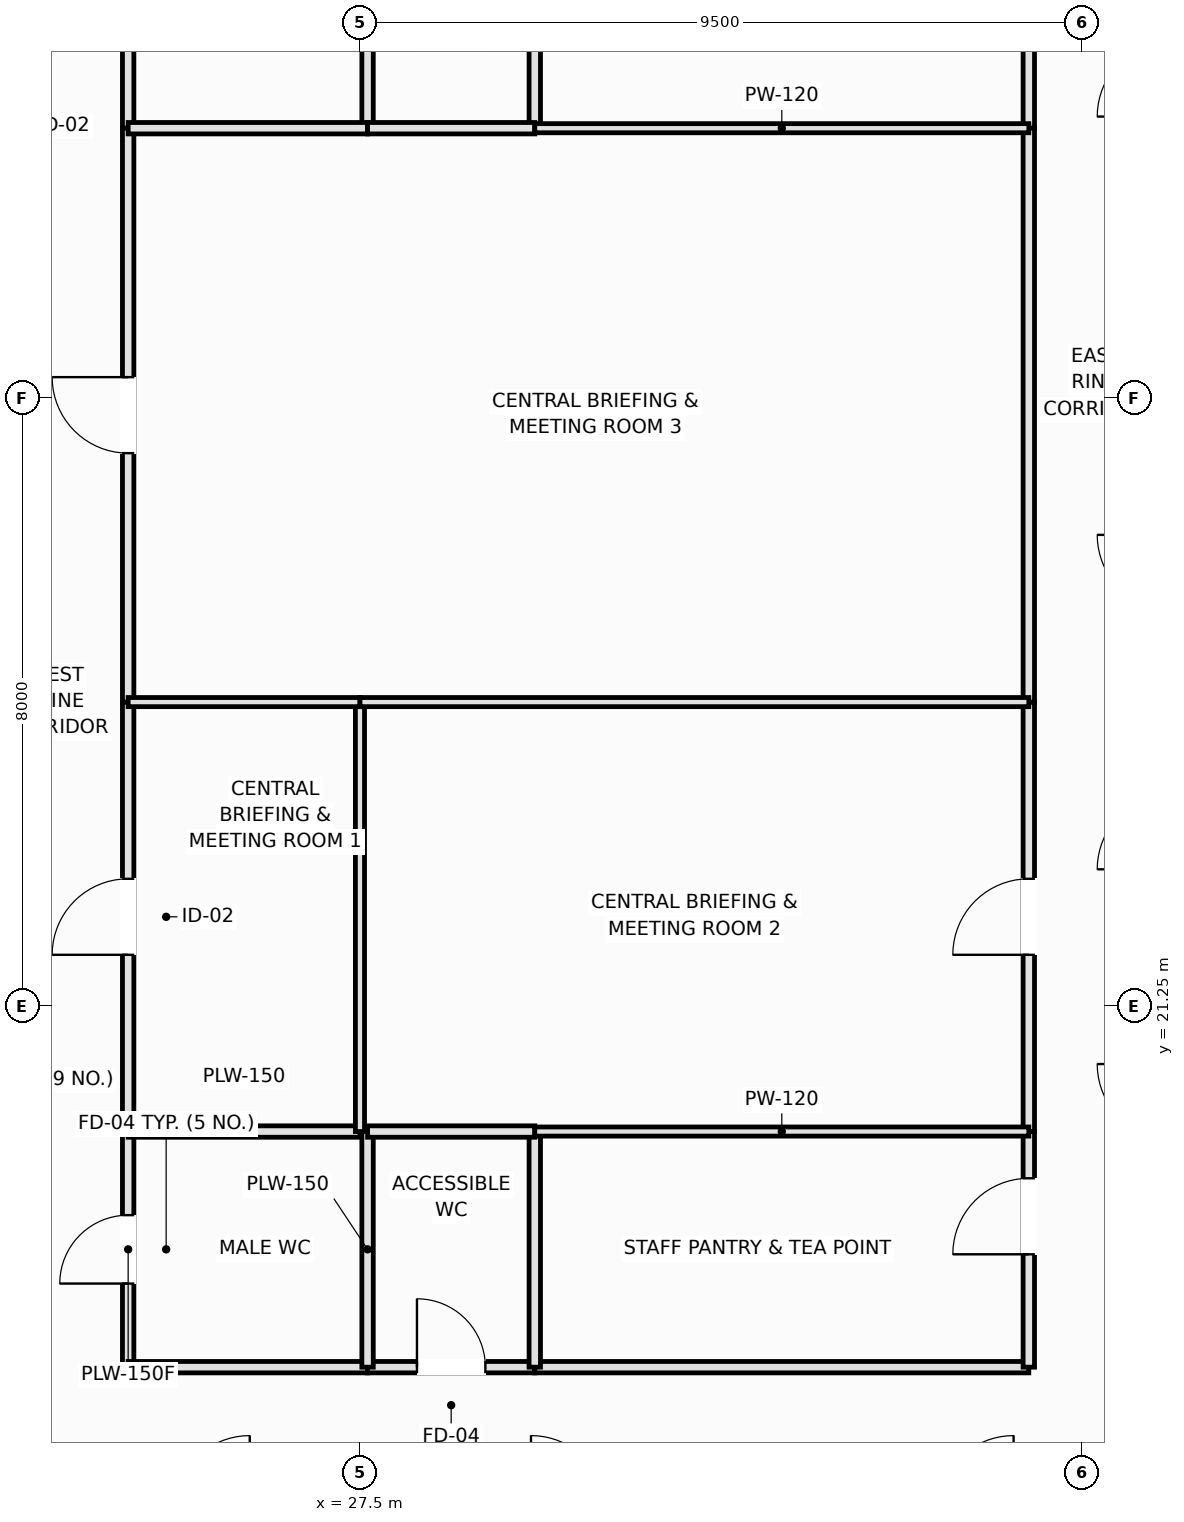
"""IFC4 building model, lengths in metres.
Left out: names, types, materials, properties, quantities, classifications, styles, units other than length and angle.
Written with IfcOpenShell. Run it as: python <this file> out.ifc"""

import sys

from ifc_helpers import new_model, si_unit, direction, frame, frame_2d, origin, place, context, subcontext, project, spatial, rectangle, extrude, element, fill, save


model = new_model("IFC4")
c1 = context("Model", 3, precision=1e-05, world=origin(), true_north=direction((0.0, 1.0)))
c2 = subcontext(c1, "Body", "Model", "MODEL_VIEW")
j1 = project(units=[si_unit("LENGTHUNIT", "METRE"), si_unit("PLANEANGLEUNIT", "RADIAN")], contexts=[c1])
p1 = place(None, origin())
s1 = spatial("IfcSite", under=j1, at=p1, CompositionType="ELEMENT")
p2 = place(p1, origin())
s2 = spatial("IfcBuilding", under=s1, at=p2, CompositionType="ELEMENT")
p3 = place(p2, frame((0.0, 0.0, 64.65)))
s3 = spatial("IfcBuildingStorey", under=s2, at=p3, CompositionType="ELEMENT", Elevation=64.65)
p4 = place(p3, frame((24.45, 16.5, 0.0), z_axis=(0.0, 0.0, 1.0), x_axis=(0.0, 1.0, 0.0)))
e1 = element("IfcWall", 1, at=p4, inside=s3, PredefinedType="PLUMBINGWALL", context=c2, shape_type="SweptSolid", body=[
    extrude(rectangle(XDim=3.1, YDim=0.15, at=frame_2d((1.55, 0.0))), origin(), (0.0, 0.0, 1.0), 3.37),
])
p5 = place(p4, frame((1.1, 0.0, 0.0)))
e2 = element("IfcOpeningElement", 2, at=p5, cuts=e1, PredefinedType="OPENING", context=c2, shape_type="SweptSolid", body=[
    extrude(rectangle(XDim=0.9, YDim=2.1, at=frame_2d((0.45, 1.05))), frame((0.0, 0.085, 0.0), z_axis=(0.0, -1.0, 0.0), x_axis=(1.0, 0.0, 0.0)), (0.0, 0.0, 1.0), 0.17),
])
p6 = place(p3, frame((24.45, 32.8, 0.0), z_axis=(0.0, 0.0, 1.0), x_axis=(0.0, 1.0, 0.0)))
e3 = element("IfcWall", 3, at=p6, inside=s3, PredefinedType="PLUMBINGWALL", context=c2, shape_type="SweptSolid", body=[
    extrude(rectangle(XDim=3.1, YDim=0.15, at=frame_2d((1.55, 0.0))), origin(), (0.0, 0.0, 1.0), 3.37),
])
p7 = place(p6, frame((1.1, 0.0, 0.0)))
e4 = element("IfcOpeningElement", 4, at=p7, cuts=e3, PredefinedType="OPENING", context=c2, shape_type="SweptSolid", body=[
    extrude(rectangle(XDim=0.9, YDim=2.1, at=frame_2d((0.45, 1.05))), frame((0.0, 0.085, 0.0), z_axis=(0.0, -1.0, 0.0), x_axis=(1.0, 0.0, 0.0)), (0.0, 0.0, 1.0), 0.17),
])
p8 = place(p3, frame((24.45, 19.6, 0.0), z_axis=(0.0, 0.0, 1.0), x_axis=(0.0, 1.0, 0.0)))
e5 = element("IfcWall", 5, at=p8, inside=s3, PredefinedType="PARTITIONING", context=c2, shape_type="SweptSolid", body=[
    extrude(rectangle(XDim=5.65, YDim=0.15, at=frame_2d((2.825, 0.0))), origin(), (0.0, 0.0, 1.0), 3.37),
])
p9 = place(p8, frame((2.325, 0.0, 0.0)))
e6 = element("IfcOpeningElement", 6, at=p9, cuts=e5, PredefinedType="OPENING", context=c2, shape_type="SweptSolid", body=[
    extrude(rectangle(XDim=1.0, YDim=2.15, at=frame_2d((0.5, 1.075))), frame((0.0, 0.085, 0.0), z_axis=(0.0, -1.0, 0.0), x_axis=(1.0, 0.0, 0.0)), (0.0, 0.0, 1.0), 0.17),
])
p10 = place(p3, frame((24.45, 25.25, 0.0), z_axis=(0.0, 0.0, 1.0), x_axis=(0.0, 1.0, 0.0)))
e7 = element("IfcWall", 7, at=p10, inside=s3, PredefinedType="PARTITIONING", context=c2, shape_type="SweptSolid", body=[
    extrude(rectangle(XDim=7.55, YDim=0.15, at=frame_2d((3.775, 0.0))), origin(), (0.0, 0.0, 1.0), 3.37),
])
p11 = place(p10, frame((3.275, 0.0, 0.0)))
e8 = element("IfcOpeningElement", 8, at=p11, cuts=e7, PredefinedType="OPENING", context=c2, shape_type="SweptSolid", body=[
    extrude(rectangle(XDim=1.0, YDim=2.15, at=frame_2d((0.5, 1.075))), frame((0.0, 0.085, 0.0), z_axis=(0.0, -1.0, 0.0), x_axis=(1.0, 0.0, 0.0)), (0.0, 0.0, 1.0), 0.17),
])
p12 = place(p3, frame((24.45, 16.5, 0.0), z_axis=(0.0, 0.0, 1.0), x_axis=(1.0, 0.0, 0.0)))
e9 = element("IfcWall", 9, at=p12, inside=s3, PredefinedType="PLUMBINGWALL", context=c2, shape_type="SweptSolid", body=[
    extrude(rectangle(XDim=3.15, YDim=0.15, at=frame_2d((1.575, 0.0))), origin(), (0.0, 0.0, 1.0), 3.37),
])
p13 = place(p3, frame((27.6, 16.5, 0.0), z_axis=(0.0, 0.0, 1.0), x_axis=(1.0, 0.0, 0.0)))
e10 = element("IfcWall", 10, at=p13, inside=s3, PredefinedType="PLUMBINGWALL", context=c2, shape_type="SweptSolid", body=[
    extrude(rectangle(XDim=2.2, YDim=0.15, at=frame_2d((1.1, 0.0))), origin(), (0.0, 0.0, 1.0), 3.37),
])
p14 = place(p13, frame((0.65, 0.0, 0.0)))
e11 = element("IfcOpeningElement", 11, at=p14, cuts=e10, PredefinedType="OPENING", context=c2, shape_type="SweptSolid", body=[
    extrude(rectangle(XDim=0.9, YDim=2.1, at=frame_2d((0.45, 1.05))), frame((0.0, 0.085, 0.0), z_axis=(0.0, -1.0, 0.0), x_axis=(1.0, 0.0, 0.0)), (0.0, 0.0, 1.0), 0.17),
])
p15 = place(p3, frame((29.8, 16.5, 0.0), z_axis=(0.0, 0.0, 1.0), x_axis=(1.0, 0.0, 0.0)))
e12 = element("IfcWall", 12, at=p15, inside=s3, PredefinedType="PARTITIONING", context=c2, shape_type="SweptSolid", body=[
    extrude(rectangle(XDim=6.5, YDim=0.15, at=frame_2d((3.25, 0.0))), origin(), (0.0, 0.0, 1.0), 3.37),
])
p16 = place(p3, frame((36.3, 16.5, 0.0), z_axis=(0.0, 0.0, 1.0), x_axis=(0.0, 1.0, 0.0)))
e13 = element("IfcWall", 13, at=p16, inside=s3, PredefinedType="PARTITIONING", context=c2, shape_type="SweptSolid", body=[
    extrude(rectangle(XDim=3.1, YDim=0.15, at=frame_2d((1.55, 0.0))), origin(), (0.0, 0.0, 1.0), 3.37),
])
p17 = place(p16, frame((1.485, 0.0, 0.0)))
e14 = element("IfcOpeningElement", 14, at=p17, cuts=e13, PredefinedType="OPENING", context=c2, shape_type="SweptSolid", body=[
    extrude(rectangle(XDim=1.0, YDim=2.15, at=frame_2d((0.5, 1.075))), frame((0.0, 0.085, 0.0), z_axis=(0.0, -1.0, 0.0), x_axis=(1.0, 0.0, 0.0)), (0.0, 0.0, 1.0), 0.17),
])
p18 = place(p3, frame((36.3, 32.8, 0.0), z_axis=(0.0, 0.0, 1.0), x_axis=(0.0, 1.0, 0.0)))
e15 = element("IfcWall", 15, at=p18, inside=s3, PredefinedType="PARTITIONING", context=c2, shape_type="SweptSolid", body=[
    extrude(rectangle(XDim=3.1, YDim=0.15, at=frame_2d((1.55, 0.0))), origin(), (0.0, 0.0, 1.0), 3.37),
])
p19 = place(p18, frame((1.05, 0.0, 0.0)))
e16 = element("IfcOpeningElement", 16, at=p19, cuts=e15, PredefinedType="OPENING", context=c2, shape_type="SweptSolid", body=[
    extrude(rectangle(XDim=1.0, YDim=2.15, at=frame_2d((0.5, 1.075))), frame((0.0, 0.085, 0.0), z_axis=(0.0, -1.0, 0.0), x_axis=(1.0, 0.0, 0.0)), (0.0, 0.0, 1.0), 0.17),
])
p20 = place(p3, frame((36.3, 19.6, 0.0), z_axis=(0.0, 0.0, 1.0), x_axis=(0.0, 1.0, 0.0)))
e17 = element("IfcWall", 17, at=p20, inside=s3, PredefinedType="PARTITIONING", context=c2, shape_type="SweptSolid", body=[
    extrude(rectangle(XDim=5.65, YDim=0.15, at=frame_2d((2.825, 0.0))), origin(), (0.0, 0.0, 1.0), 3.37),
])
p21 = place(p20, frame((2.325, 0.0, 0.0)))
e18 = element("IfcOpeningElement", 18, at=p21, cuts=e17, PredefinedType="OPENING", context=c2, shape_type="SweptSolid", body=[
    extrude(rectangle(XDim=1.0, YDim=2.15, at=frame_2d((0.5, 1.075))), frame((0.0, 0.085, 0.0), z_axis=(0.0, -1.0, 0.0), x_axis=(1.0, 0.0, 0.0)), (0.0, 0.0, 1.0), 0.17),
])
p22 = place(p3, frame((36.3, 25.25, 0.0), z_axis=(0.0, 0.0, 1.0), x_axis=(0.0, 1.0, 0.0)))
e19 = element("IfcWall", 19, at=p22, inside=s3, PredefinedType="PARTITIONING", context=c2, shape_type="SweptSolid", body=[
    extrude(rectangle(XDim=7.55, YDim=0.15, at=frame_2d((3.775, 0.0))), origin(), (0.0, 0.0, 1.0), 3.37),
])
p23 = place(p3, frame((27.6, 16.5, 0.0), z_axis=(0.0, 0.0, 1.0), x_axis=(0.0, 1.0, 0.0)))
e20 = element("IfcWall", 20, at=p23, inside=s3, PredefinedType="PLUMBINGWALL", context=c2, shape_type="SweptSolid", body=[
    extrude(rectangle(XDim=3.1, YDim=0.15, at=frame_2d((1.55, 0.0))), origin(), (0.0, 0.0, 1.0), 3.37),
])
p24 = place(p3, frame((24.45, 19.6, 0.0), z_axis=(0.0, 0.0, 1.0), x_axis=(1.0, 0.0, 0.0)))
e21 = element("IfcWall", 21, at=p24, inside=s3, PredefinedType="PLUMBINGWALL", context=c2, shape_type="SweptSolid", body=[
    extrude(rectangle(XDim=3.05, YDim=0.15, at=frame_2d((1.525, 0.0))), origin(), (0.0, 0.0, 1.0), 3.37),
])
p25 = place(p3, frame((27.6, 32.8, 0.0), z_axis=(0.0, 0.0, 1.0), x_axis=(0.0, 1.0, 0.0)))
e22 = element("IfcWall", 22, at=p25, inside=s3, PredefinedType="PLUMBINGWALL", context=c2, shape_type="SweptSolid", body=[
    extrude(rectangle(XDim=3.1, YDim=0.15, at=frame_2d((1.55, 0.0))), origin(), (0.0, 0.0, 1.0), 3.37),
])
p26 = place(p3, frame((24.45, 32.8, 0.0), z_axis=(0.0, 0.0, 1.0), x_axis=(1.0, 0.0, 0.0)))
e23 = element("IfcWall", 23, at=p26, inside=s3, PredefinedType="PLUMBINGWALL", context=c2, shape_type="SweptSolid", body=[
    extrude(rectangle(XDim=3.15, YDim=0.15, at=frame_2d((1.575, 0.0))), origin(), (0.0, 0.0, 1.0), 3.37),
])
p27 = place(p3, frame((29.8, 16.5, 0.0), z_axis=(0.0, 0.0, 1.0), x_axis=(0.0, 1.0, 0.0)))
e24 = element("IfcWall", 24, at=p27, inside=s3, PredefinedType="PLUMBINGWALL", context=c2, shape_type="SweptSolid", body=[
    extrude(rectangle(XDim=3.1, YDim=0.15, at=frame_2d((1.55, 0.0))), origin(), (0.0, 0.0, 1.0), 3.37),
])
p28 = place(p3, frame((27.6, 19.6, 0.0), z_axis=(0.0, 0.0, 1.0), x_axis=(1.0, 0.0, 0.0)))
e25 = element("IfcWall", 25, at=p28, inside=s3, PredefinedType="PLUMBINGWALL", context=c2, shape_type="SweptSolid", body=[
    extrude(rectangle(XDim=2.2, YDim=0.15, at=frame_2d((1.1, 0.0))), origin(), (0.0, 0.0, 1.0), 3.37),
])
p29 = place(p3, frame((29.8, 32.8, 0.0), z_axis=(0.0, 0.0, 1.0), x_axis=(0.0, 1.0, 0.0)))
e26 = element("IfcWall", 26, at=p29, inside=s3, PredefinedType="PLUMBINGWALL", context=c2, shape_type="SweptSolid", body=[
    extrude(rectangle(XDim=3.1, YDim=0.15, at=frame_2d((1.55, 0.0))), origin(), (0.0, 0.0, 1.0), 3.37),
])
p30 = place(p3, frame((27.6, 32.8, 0.0), z_axis=(0.0, 0.0, 1.0), x_axis=(1.0, 0.0, 0.0)))
e27 = element("IfcWall", 27, at=p30, inside=s3, PredefinedType="PLUMBINGWALL", context=c2, shape_type="SweptSolid", body=[
    extrude(rectangle(XDim=2.2, YDim=0.15, at=frame_2d((1.1, 0.0))), origin(), (0.0, 0.0, 1.0), 3.37),
])
for number, where, z_axis, x_axis in (
    (28, (29.8, 19.6, 0.0), (0.0, 0.0, 1.0), (1.0, 0.0, 0.0)),
    (29, (29.8, 32.8, 0.0), (0.0, 0.0, 1.0), (1.0, 0.0, 0.0)),
):
    element("IfcWall", number, at=place(p3, frame(where, z_axis=z_axis, x_axis=x_axis)), inside=s3, PredefinedType="PARTITIONING", context=c2, shape_type="SweptSolid", body=[
        extrude(rectangle(XDim=6.5, YDim=0.12, at=frame_2d((3.25, 0.0))), origin(), (0.0, 0.0, 1.0), 3.37),
    ])
p31 = place(p3, frame((27.5, 19.6, 0.0), z_axis=(0.0, 0.0, 1.0), x_axis=(0.0, 1.0, 0.0)))
e30 = element("IfcWall", 30, at=p31, inside=s3, PredefinedType="PARTITIONING", context=c2, shape_type="SweptSolid", body=[
    extrude(rectangle(XDim=5.65, YDim=0.12, at=frame_2d((2.825, 0.0))), origin(), (0.0, 0.0, 1.0), 3.37),
])
p32 = place(p3, frame((24.45, 25.25, 0.0), z_axis=(0.0, 0.0, 1.0), x_axis=(1.0, 0.0, 0.0)))
e31 = element("IfcWall", 31, at=p32, inside=s3, PredefinedType="PARTITIONING", context=c2, shape_type="SweptSolid", body=[
    extrude(rectangle(XDim=3.05, YDim=0.12, at=frame_2d((1.525, 0.0))), origin(), (0.0, 0.0, 1.0), 2.72),
])
p33 = place(p3, frame((27.5, 25.25, 0.0), z_axis=(0.0, 0.0, 1.0), x_axis=(1.0, 0.0, 0.0)))
e32 = element("IfcWall", 32, at=p33, inside=s3, PredefinedType="PARTITIONING", context=c2, shape_type="SweptSolid", body=[
    extrude(rectangle(XDim=8.8, YDim=0.12, at=frame_2d((4.4, 0.0))), origin(), (0.0, 0.0, 1.0), 2.72),
])
p34 = place(p5, origin())
e33 = element("IfcDoor", 33, at=p34, inside=s3, OperationType="SINGLE_SWING_LEFT", PredefinedType="DOOR", context=c2, shape_type="SweptSolid", body=[
    extrude(rectangle(XDim=0.9, YDim=2.1, at=frame_2d((0.45, 1.05))), frame((0.0, 0.025, 0.0), z_axis=(0.0, -1.0, 0.0), x_axis=(1.0, 0.0, 0.0)), (0.0, 0.0, 1.0), 0.05),
])
fill(e2, e33)
p35 = place(p9, origin())
e34 = element("IfcDoor", 34, at=p35, inside=s3, OperationType="SINGLE_SWING_LEFT", PredefinedType="DOOR", context=c2, shape_type="SweptSolid", body=[
    extrude(rectangle(XDim=1.0, YDim=2.15, at=frame_2d((0.5, 1.075))), frame((0.0, 0.025, 0.0), z_axis=(0.0, -1.0, 0.0), x_axis=(1.0, 0.0, 0.0)), (0.0, 0.0, 1.0), 0.05),
])
fill(e6, e34)
p36 = place(p11, origin())
e35 = element("IfcDoor", 35, at=p36, inside=s3, OperationType="SINGLE_SWING_RIGHT", PredefinedType="DOOR", context=c2, shape_type="SweptSolid", body=[
    extrude(rectangle(XDim=1.0, YDim=2.15, at=frame_2d((0.5, 1.075))), frame((0.0, 0.025, 0.0), z_axis=(0.0, -1.0, 0.0), x_axis=(1.0, 0.0, 0.0)), (0.0, 0.0, 1.0), 0.05),
])
fill(e8, e35)
p37 = place(p14, origin())
e36 = element("IfcDoor", 36, at=p37, inside=s3, OperationType="SINGLE_SWING_LEFT", PredefinedType="DOOR", context=c2, shape_type="SweptSolid", body=[
    extrude(rectangle(XDim=0.9, YDim=2.1, at=frame_2d((0.45, 1.05))), frame((0.0, 0.025, 0.0), z_axis=(0.0, -1.0, 0.0), x_axis=(1.0, 0.0, 0.0)), (0.0, 0.0, 1.0), 0.05),
])
fill(e11, e36)
p38 = place(p17, origin())
e37 = element("IfcDoor", 37, at=p38, inside=s3, OperationType="SINGLE_SWING_LEFT", PredefinedType="DOOR", context=c2, shape_type="SweptSolid", body=[
    extrude(rectangle(XDim=1.0, YDim=2.15, at=frame_2d((0.5, 1.075))), frame((0.0, 0.025, 0.0), z_axis=(0.0, -1.0, 0.0), x_axis=(1.0, 0.0, 0.0)), (0.0, 0.0, 1.0), 0.05),
])
fill(e14, e37)
p39 = place(p21, origin())
e38 = element("IfcDoor", 38, at=p39, inside=s3, OperationType="SINGLE_SWING_LEFT", PredefinedType="DOOR", context=c2, shape_type="SweptSolid", body=[
    extrude(rectangle(XDim=1.0, YDim=2.15, at=frame_2d((0.5, 1.075))), frame((0.0, 0.025, 0.0), z_axis=(0.0, -1.0, 0.0), x_axis=(1.0, 0.0, 0.0)), (0.0, 0.0, 1.0), 0.05),
])
fill(e18, e38)
save(model, sys.argv[1])
